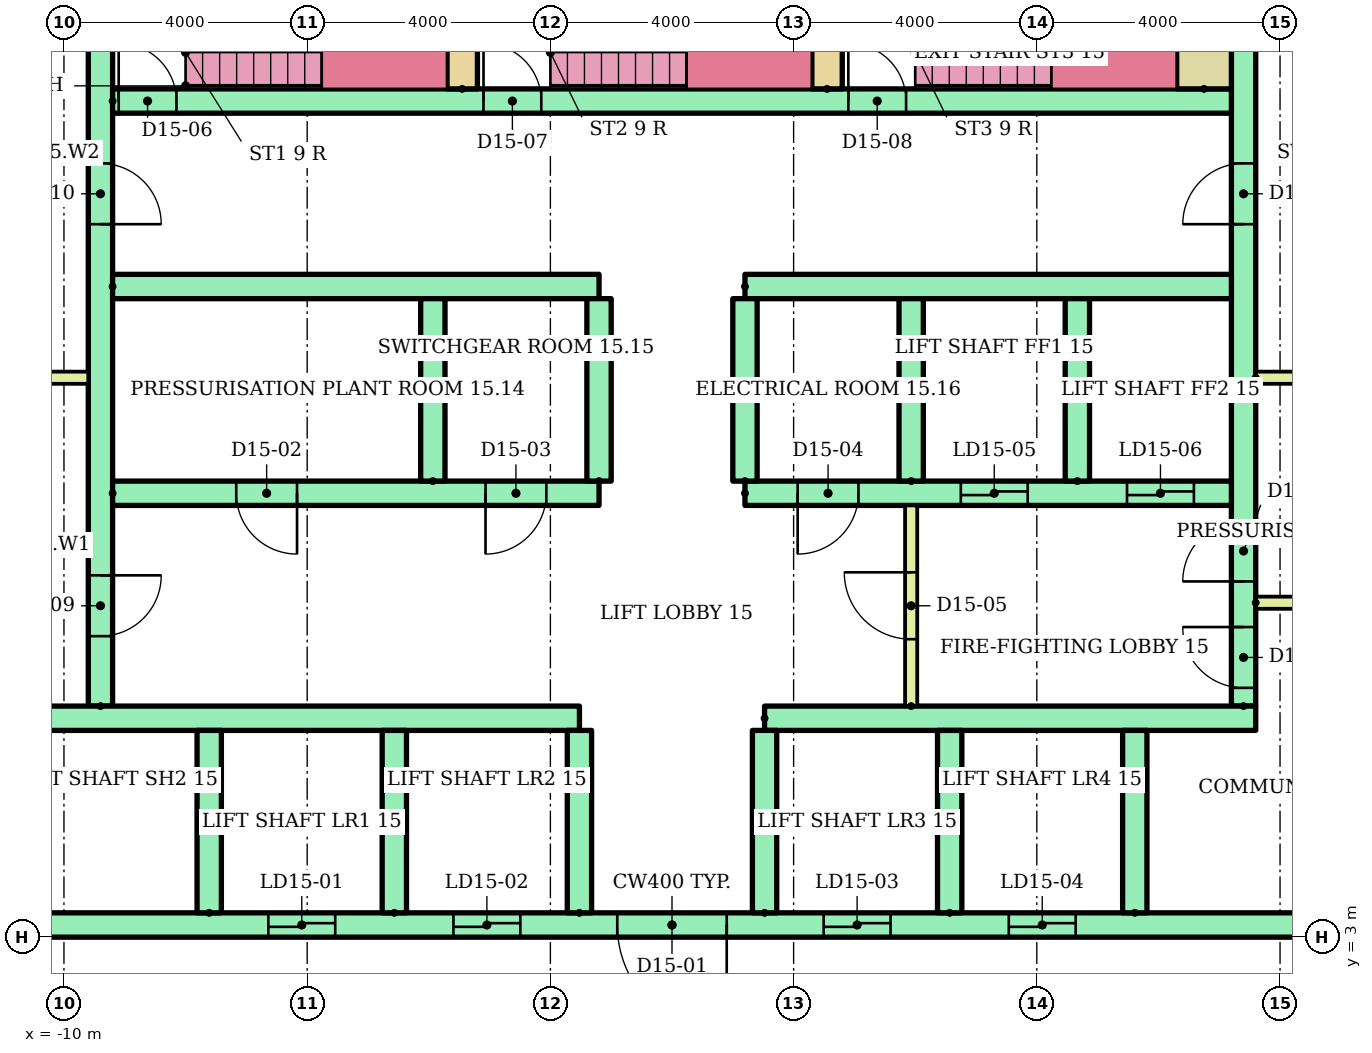
"""IFC4 building model, lengths in metres.
Left out: names, types, materials, properties, quantities, classifications, styles, units other than length and angle.
Written with IfcOpenShell. Run it as: python <this file> out.ifc"""

import sys

from ifc_helpers import new_model, si_unit, direction, frame, frame_2d, origin, place, context, subcontext, project, spatial, rectangle, extrude, element, fill, save


model = new_model("IFC4")
c1 = context("Model", 3, precision=1e-05, world=origin(), true_north=direction((0.0, 1.0)))
c2 = subcontext(c1, "Body", "Model", "MODEL_VIEW")
j1 = project(units=[si_unit("LENGTHUNIT", "METRE"), si_unit("PLANEANGLEUNIT", "RADIAN")], contexts=[c1])
p1 = place(None, origin())
s1 = spatial("IfcSite", under=j1, at=p1, CompositionType="ELEMENT")
p2 = place(p1, origin())
s2 = spatial("IfcBuilding", under=s1, at=p2, CompositionType="ELEMENT")
p3 = place(p2, frame((0.0, 0.0, 57.6)))
s3 = spatial("IfcBuildingStorey", under=s2, at=p3, CompositionType="ELEMENT", Elevation=57.6)
p4 = place(p3, frame((-9.4, 6.8, 0.0), z_axis=(0.0, 0.0, 1.0), x_axis=(0.0, 1.0, 0.0)))
e1 = element("IfcWall", 1, at=p4, inside=s3, PredefinedType="SHEAR", context=c2, shape_type="SweptSolid", body=[
    extrude(rectangle(XDim=12.7, YDim=0.4, at=frame_2d((6.35, 0.0))), origin(), (0.0, 0.0, 1.0), 2.92),
])
p5 = place(p4, frame((1.15, 0.0, 0.0)))
e2 = element("IfcOpeningElement", 2, at=p5, cuts=e1, PredefinedType="OPENING", context=c2, shape_type="SweptSolid", body=[
    extrude(rectangle(XDim=1.0, YDim=2.1, at=frame_2d((0.5, 1.05))), frame((0.0, 0.21, 0.0), z_axis=(0.0, -1.0, 0.0), x_axis=(1.0, 0.0, 0.0)), (0.0, 0.0, 1.0), 0.42),
])
p6 = place(p4, frame((7.925, 0.0, 0.0)))
e3 = element("IfcOpeningElement", 3, at=p6, cuts=e1, PredefinedType="OPENING", context=c2, shape_type="SweptSolid", body=[
    extrude(rectangle(XDim=1.0, YDim=2.1, at=frame_2d((0.5, 1.05))), frame((0.0, 0.21, 0.0), z_axis=(0.0, -1.0, 0.0), x_axis=(1.0, 0.0, 0.0)), (0.0, 0.0, 1.0), 0.42),
])
p7 = place(p3, frame((9.4, 6.8, 0.0), z_axis=(0.0, 0.0, 1.0), x_axis=(0.0, 1.0, 0.0)))
e4 = element("IfcWall", 4, at=p7, inside=s3, PredefinedType="SHEAR", context=c2, shape_type="SweptSolid", body=[
    extrude(rectangle(XDim=12.7, YDim=0.4, at=frame_2d((6.35, 0.0))), origin(), (0.0, 0.0, 1.0), 2.92),
])
p8 = place(p7, frame((0.3, 0.0, 0.0)))
e5 = element("IfcOpeningElement", 5, at=p8, cuts=e4, PredefinedType="OPENING", context=c2, shape_type="SweptSolid", body=[
    extrude(rectangle(XDim=1.0, YDim=2.1, at=frame_2d((0.5, 1.05))), frame((0.0, 0.21, 0.0), z_axis=(0.0, -1.0, 0.0), x_axis=(1.0, 0.0, 0.0)), (0.0, 0.0, 1.0), 0.42),
])
p9 = place(p7, frame((2.05, 0.0, 0.0)))
e6 = element("IfcOpeningElement", 6, at=p9, cuts=e4, PredefinedType="OPENING", context=c2, shape_type="SweptSolid", body=[
    extrude(rectangle(XDim=1.0, YDim=2.1, at=frame_2d((0.5, 1.05))), frame((0.0, 0.21, 0.0), z_axis=(0.0, -1.0, 0.0), x_axis=(1.0, 0.0, 0.0)), (0.0, 0.0, 1.0), 0.42),
])
p10 = place(p7, frame((7.925, 0.0, 0.0)))
e7 = element("IfcOpeningElement", 7, at=p10, cuts=e4, PredefinedType="OPENING", context=c2, shape_type="SweptSolid", body=[
    extrude(rectangle(XDim=1.0, YDim=2.1, at=frame_2d((0.5, 1.05))), frame((0.0, 0.21, 0.0), z_axis=(0.0, -1.0, 0.0), x_axis=(1.0, 0.0, 0.0)), (0.0, 0.0, 1.0), 0.42),
])
p11 = place(p3, frame((-13.5, 3.2, 0.0)))
e8 = element("IfcWall", 8, at=p11, inside=s3, PredefinedType="SHEAR", context=c2, shape_type="SweptSolid", body=[
    extrude(rectangle(XDim=27.0, YDim=0.4, at=frame_2d((13.5, 0.0))), origin(), (0.0, 0.0, 1.0), 2.92),
])
p12 = place(p11, frame((6.861, 0.0, 0.0)))
e9 = element("IfcOpeningElement", 9, at=p12, cuts=e8, PredefinedType="OPENING", context=c2, shape_type="SweptSolid", body=[
    extrude(rectangle(XDim=1.1, YDim=2.1, at=frame_2d((0.55, 1.05))), frame((0.0, 0.21, 0.0), z_axis=(0.0, -1.0, 0.0), x_axis=(1.0, 0.0, 0.0)), (0.0, 0.0, 1.0), 0.42),
])
p13 = place(p11, frame((9.906, 0.0, 0.0)))
e10 = element("IfcOpeningElement", 10, at=p13, cuts=e8, PredefinedType="OPENING", context=c2, shape_type="SweptSolid", body=[
    extrude(rectangle(XDim=1.1, YDim=2.1, at=frame_2d((0.55, 1.05))), frame((0.0, 0.21, 0.0), z_axis=(0.0, -1.0, 0.0), x_axis=(1.0, 0.0, 0.0)), (0.0, 0.0, 1.0), 0.42),
])
p14 = place(p11, frame((15.994, 0.0, 0.0)))
e11 = element("IfcOpeningElement", 11, at=p14, cuts=e8, PredefinedType="OPENING", context=c2, shape_type="SweptSolid", body=[
    extrude(rectangle(XDim=1.1, YDim=2.1, at=frame_2d((0.55, 1.05))), frame((0.0, 0.21, 0.0), z_axis=(0.0, -1.0, 0.0), x_axis=(1.0, 0.0, 0.0)), (0.0, 0.0, 1.0), 0.42),
])
p15 = place(p11, frame((19.039, 0.0, 0.0)))
e12 = element("IfcOpeningElement", 12, at=p15, cuts=e8, PredefinedType="OPENING", context=c2, shape_type="SweptSolid", body=[
    extrude(rectangle(XDim=1.1, YDim=2.1, at=frame_2d((0.55, 1.05))), frame((0.0, 0.21, 0.0), z_axis=(0.0, -1.0, 0.0), x_axis=(1.0, 0.0, 0.0)), (0.0, 0.0, 1.0), 0.42),
])
p16 = place(p11, frame((12.6, 0.0, 0.0)))
e13 = element("IfcOpeningElement", 13, at=p16, cuts=e8, PredefinedType="OPENING", context=c2, shape_type="SweptSolid", body=[
    extrude(rectangle(XDim=1.8, YDim=2.1, at=frame_2d((0.9, 1.05))), frame((0.0, 0.21, 0.0), z_axis=(0.0, -1.0, 0.0), x_axis=(1.0, 0.0, 0.0)), (0.0, 0.0, 1.0), 0.42),
])
p17 = place(p3, frame((-13.5, 6.6, 0.0)))
e14 = element("IfcWall", 14, at=p17, inside=s3, PredefinedType="SHEAR", context=c2, shape_type="SweptSolid", body=[
    extrude(rectangle(XDim=11.978, YDim=0.4, at=frame_2d((5.989, 0.0))), origin(), (0.0, 0.0, 1.0), 2.92),
])
p18 = place(p3, frame((1.522, 6.6, 0.0)))
e15 = element("IfcWall", 15, at=p18, inside=s3, PredefinedType="SHEAR", context=c2, shape_type="SweptSolid", body=[
    extrude(rectangle(XDim=8.078, YDim=0.4, at=frame_2d((4.039, 0.0))), origin(), (0.0, 0.0, 1.0), 2.92),
])
for number, where, z_axis, x_axis in (
    (16, (-7.611, 3.4, 0.0), (0.0, 0.0, 1.0), (0.0, 1.0, 0.0)),
    (17, (-4.567, 3.4, 0.0), (0.0, 0.0, 1.0), (0.0, 1.0, 0.0)),
    (18, (-1.522, 3.4, 0.0), (0.0, 0.0, 1.0), (0.0, 1.0, 0.0)),
    (19, (1.522, 3.4, 0.0), (0.0, 0.0, 1.0), (0.0, 1.0, 0.0)),
    (20, (4.567, 3.4, 0.0), (0.0, 0.0, 1.0), (0.0, 1.0, 0.0)),
    (21, (7.611, 3.4, 0.0), (0.0, 0.0, 1.0), (0.0, 1.0, 0.0)),
):
    element("IfcWall", number, at=place(p3, frame(where, z_axis=z_axis, x_axis=x_axis)), inside=s3, PredefinedType="SHEAR", context=c2, shape_type="SweptSolid", body=[
        extrude(rectangle(XDim=3.0, YDim=0.4, at=frame_2d((1.5, 0.0))), origin(), (0.0, 0.0, 1.0), 2.92),
    ])
p19 = place(p3, frame((-9.2, 10.3, 0.0)))
e22 = element("IfcWall", 22, at=p19, inside=s3, PredefinedType="SHEAR", context=c2, shape_type="SweptSolid", body=[
    extrude(rectangle(XDim=8.0, YDim=0.4, at=frame_2d((4.0, 0.0))), origin(), (0.0, 0.0, 1.0), 2.92),
])
p20 = place(p19, frame((2.033, 0.0, 0.0)))
e23 = element("IfcOpeningElement", 23, at=p20, cuts=e22, PredefinedType="OPENING", context=c2, shape_type="SweptSolid", body=[
    extrude(rectangle(XDim=1.0, YDim=2.1, at=frame_2d((0.5, 1.05))), frame((0.0, 0.21, 0.0), z_axis=(0.0, -1.0, 0.0), x_axis=(1.0, 0.0, 0.0)), (0.0, 0.0, 1.0), 0.42),
])
p21 = place(p19, frame((6.133, 0.0, 0.0)))
e24 = element("IfcOpeningElement", 24, at=p21, cuts=e22, PredefinedType="OPENING", context=c2, shape_type="SweptSolid", body=[
    extrude(rectangle(XDim=1.0, YDim=2.1, at=frame_2d((0.5, 1.05))), frame((0.0, 0.21, 0.0), z_axis=(0.0, -1.0, 0.0), x_axis=(1.0, 0.0, 0.0)), (0.0, 0.0, 1.0), 0.42),
])
p22 = place(p3, frame((-9.2, 13.7, 0.0)))
e25 = element("IfcWall", 25, at=p22, inside=s3, PredefinedType="SHEAR", context=c2, shape_type="SweptSolid", body=[
    extrude(rectangle(XDim=8.0, YDim=0.4, at=frame_2d((4.0, 0.0))), origin(), (0.0, 0.0, 1.0), 2.92),
])
p23 = place(p3, frame((1.2, 10.3, 0.0)))
e26 = element("IfcWall", 26, at=p23, inside=s3, PredefinedType="SHEAR", context=c2, shape_type="SweptSolid", body=[
    extrude(rectangle(XDim=8.0, YDim=0.4, at=frame_2d((4.0, 0.0))), origin(), (0.0, 0.0, 1.0), 2.92),
])
p24 = place(p23, frame((3.55, 0.0, 0.0)))
e27 = element("IfcOpeningElement", 27, at=p24, cuts=e26, PredefinedType="OPENING", context=c2, shape_type="SweptSolid", body=[
    extrude(rectangle(XDim=1.1, YDim=2.1, at=frame_2d((0.55, 1.05))), frame((0.0, 0.21, 0.0), z_axis=(0.0, -1.0, 0.0), x_axis=(1.0, 0.0, 0.0)), (0.0, 0.0, 1.0), 0.42),
])
p25 = place(p23, frame((6.283, 0.0, 0.0)))
e28 = element("IfcOpeningElement", 28, at=p25, cuts=e26, PredefinedType="OPENING", context=c2, shape_type="SweptSolid", body=[
    extrude(rectangle(XDim=1.1, YDim=2.1, at=frame_2d((0.55, 1.05))), frame((0.0, 0.21, 0.0), z_axis=(0.0, -1.0, 0.0), x_axis=(1.0, 0.0, 0.0)), (0.0, 0.0, 1.0), 0.42),
])
p26 = place(p23, frame((0.867, 0.0, 0.0)))
e29 = element("IfcOpeningElement", 29, at=p26, cuts=e26, PredefinedType="OPENING", context=c2, shape_type="SweptSolid", body=[
    extrude(rectangle(XDim=1.0, YDim=2.1, at=frame_2d((0.5, 1.05))), frame((0.0, 0.21, 0.0), z_axis=(0.0, -1.0, 0.0), x_axis=(1.0, 0.0, 0.0)), (0.0, 0.0, 1.0), 0.42),
])
p27 = place(p3, frame((1.2, 13.7, 0.0)))
e30 = element("IfcWall", 30, at=p27, inside=s3, PredefinedType="SHEAR", context=c2, shape_type="SweptSolid", body=[
    extrude(rectangle(XDim=8.0, YDim=0.4, at=frame_2d((4.0, 0.0))), origin(), (0.0, 0.0, 1.0), 2.92),
])
for number, where, z_axis, x_axis in (
    (31, (-3.933, 10.5, 0.0), (0.0, 0.0, 1.0), (0.0, 1.0, 0.0)),
    (32, (-1.2, 10.5, 0.0), (0.0, 0.0, 1.0), (0.0, 1.0, 0.0)),
    (33, (1.2, 10.5, 0.0), (0.0, 0.0, 1.0), (0.0, 1.0, 0.0)),
    (34, (3.933, 10.5, 0.0), (0.0, 0.0, 1.0), (0.0, 1.0, 0.0)),
    (35, (6.667, 10.5, 0.0), (0.0, 0.0, 1.0), (0.0, 1.0, 0.0)),
):
    element("IfcWall", number, at=place(p3, frame(where, z_axis=z_axis, x_axis=x_axis)), inside=s3, PredefinedType="SHEAR", context=c2, shape_type="SweptSolid", body=[
        extrude(rectangle(XDim=3.0, YDim=0.4, at=frame_2d((1.5, 0.0))), origin(), (0.0, 0.0, 1.0), 2.92),
    ])
p28 = place(p3, frame((3.933, 6.8, 0.0), z_axis=(0.0, 0.0, 1.0), x_axis=(0.0, 1.0, 0.0)))
e36 = element("IfcWall", 36, at=p28, inside=s3, PredefinedType="PARTITIONING", context=c2, shape_type="SweptSolid", body=[
    extrude(rectangle(XDim=3.3, YDim=0.2, at=frame_2d((1.65, 0.0))), origin(), (0.0, 0.0, 1.0), 2.92),
])
p29 = place(p28, frame((1.1, 0.0, 0.0)))
e37 = element("IfcOpeningElement", 37, at=p29, cuts=e36, PredefinedType="OPENING", context=c2, shape_type="SweptSolid", body=[
    extrude(rectangle(XDim=1.1, YDim=2.1, at=frame_2d((0.55, 1.05))), frame((0.0, 0.11, 0.0), z_axis=(0.0, -1.0, 0.0), x_axis=(1.0, 0.0, 0.0)), (0.0, 0.0, 1.0), 0.22),
])
p30 = place(p3, frame((-9.2, 16.75, 0.0)))
e38 = element("IfcWall", 38, at=p30, inside=s3, PredefinedType="SHEAR", context=c2, shape_type="SweptSolid", body=[
    extrude(rectangle(XDim=18.4, YDim=0.4, at=frame_2d((9.2, 0.0))), origin(), (0.0, 0.0, 1.0), 2.92),
])
p31 = place(p30, frame((0.1, 0.0, 0.0)))
e39 = element("IfcOpeningElement", 39, at=p31, cuts=e38, PredefinedType="OPENING", context=c2, shape_type="SweptSolid", body=[
    extrude(rectangle(XDim=0.95, YDim=2.1, at=frame_2d((0.475, 1.05))), frame((0.0, 0.21, 0.0), z_axis=(0.0, -1.0, 0.0), x_axis=(1.0, 0.0, 0.0)), (0.0, 0.0, 1.0), 0.42),
])
p32 = place(p30, frame((6.1, 0.0, 0.0)))
e40 = element("IfcOpeningElement", 40, at=p32, cuts=e38, PredefinedType="OPENING", context=c2, shape_type="SweptSolid", body=[
    extrude(rectangle(XDim=0.95, YDim=2.1, at=frame_2d((0.475, 1.05))), frame((0.0, 0.21, 0.0), z_axis=(0.0, -1.0, 0.0), x_axis=(1.0, 0.0, 0.0)), (0.0, 0.0, 1.0), 0.42),
])
p33 = place(p30, frame((12.1, 0.0, 0.0)))
e41 = element("IfcOpeningElement", 41, at=p33, cuts=e38, PredefinedType="OPENING", context=c2, shape_type="SweptSolid", body=[
    extrude(rectangle(XDim=0.95, YDim=2.1, at=frame_2d((0.475, 1.05))), frame((0.0, 0.21, 0.0), z_axis=(0.0, -1.0, 0.0), x_axis=(1.0, 0.0, 0.0)), (0.0, 0.0, 1.0), 0.42),
])
for number, where, z_axis, x_axis in (
    (42, (-3.45, 16.95, 0.0), (0.0, 0.0, 1.0), (0.0, 1.0, 0.0)),
    (43, (2.55, 16.95, 0.0), (0.0, 0.0, 1.0), (0.0, 1.0, 0.0)),
):
    element("IfcWall", number, at=place(p3, frame(where, z_axis=z_axis, x_axis=x_axis)), inside=s3, PredefinedType="SHEAR", context=c2, shape_type="SweptSolid", body=[
        extrude(rectangle(XDim=2.55, YDim=0.5, at=frame_2d((1.275, 0.0))), origin(), (0.0, 0.0, 1.0), 2.92),
    ])
p34 = place(p3, frame((8.75, 16.95, 0.0), z_axis=(0.0, 0.0, 1.0), x_axis=(0.0, 1.0, 0.0)))
e44 = element("IfcWall", 44, at=p34, inside=s3, PredefinedType="SHEAR", context=c2, shape_type="SweptSolid", body=[
    extrude(rectangle(XDim=2.55, YDim=0.9, at=frame_2d((1.275, 0.0))), origin(), (0.0, 0.0, 1.0), 2.92),
])
for number, where in (
    (45, (-13.5, 12.2, 0.0)),
    (46, (9.6, 8.5, 0.0)),
    (47, (9.6, 12.2, 0.0)),
):
    element("IfcWall", number, at=place(p3, frame(where)), inside=s3, PredefinedType="PARTITIONING", context=c2, shape_type="SweptSolid", body=[
        extrude(rectangle(XDim=3.9, YDim=0.2, at=frame_2d((1.95, 0.0))), origin(), (0.0, 0.0, 1.0), 2.92),
    ])
p35 = place(p12, origin())
e48 = element("IfcDoor", 48, at=p35, inside=s3, OperationType="SLIDING_TO_LEFT", PredefinedType="DOOR", context=c2, shape_type="SweptSolid", body=[
    extrude(rectangle(XDim=1.1, YDim=2.1, at=frame_2d((0.55, 1.05))), frame((0.0, 0.025, 0.0), z_axis=(0.0, -1.0, 0.0), x_axis=(1.0, 0.0, 0.0)), (0.0, 0.0, 1.0), 0.05),
])
fill(e9, e48)
p36 = place(p13, origin())
e49 = element("IfcDoor", 49, at=p36, inside=s3, OperationType="SLIDING_TO_LEFT", PredefinedType="DOOR", context=c2, shape_type="SweptSolid", body=[
    extrude(rectangle(XDim=1.1, YDim=2.1, at=frame_2d((0.55, 1.05))), frame((0.0, 0.025, 0.0), z_axis=(0.0, -1.0, 0.0), x_axis=(1.0, 0.0, 0.0)), (0.0, 0.0, 1.0), 0.05),
])
fill(e10, e49)
p37 = place(p14, origin())
e50 = element("IfcDoor", 50, at=p37, inside=s3, OperationType="SLIDING_TO_LEFT", PredefinedType="DOOR", context=c2, shape_type="SweptSolid", body=[
    extrude(rectangle(XDim=1.1, YDim=2.1, at=frame_2d((0.55, 1.05))), frame((0.0, 0.025, 0.0), z_axis=(0.0, -1.0, 0.0), x_axis=(1.0, 0.0, 0.0)), (0.0, 0.0, 1.0), 0.05),
])
fill(e11, e50)
p38 = place(p15, origin())
e51 = element("IfcDoor", 51, at=p38, inside=s3, OperationType="SLIDING_TO_LEFT", PredefinedType="DOOR", context=c2, shape_type="SweptSolid", body=[
    extrude(rectangle(XDim=1.1, YDim=2.1, at=frame_2d((0.55, 1.05))), frame((0.0, 0.025, 0.0), z_axis=(0.0, -1.0, 0.0), x_axis=(1.0, 0.0, 0.0)), (0.0, 0.0, 1.0), 0.05),
])
fill(e12, e51)
p39 = place(p16, frame((1.8, 0.0, 0.0), z_axis=(0.0, 0.0, 1.0), x_axis=(-1.0, 0.0, 0.0)))
e52 = element("IfcDoor", 52, at=p39, inside=s3, OperationType="DOUBLE_DOOR_SINGLE_SWING", PredefinedType="DOOR", context=c2, shape_type="SweptSolid", body=[
    extrude(rectangle(XDim=1.8, YDim=2.1, at=frame_2d((0.9, 1.05))), frame((0.0, 0.025, 0.0), z_axis=(0.0, -1.0, 0.0), x_axis=(1.0, 0.0, 0.0)), (0.0, 0.0, 1.0), 0.05),
])
fill(e13, e52)
p40 = place(p24, origin())
e53 = element("IfcDoor", 53, at=p40, inside=s3, OperationType="SLIDING_TO_LEFT", PredefinedType="DOOR", context=c2, shape_type="SweptSolid", body=[
    extrude(rectangle(XDim=1.1, YDim=2.1, at=frame_2d((0.55, 1.05))), frame((0.0, 0.025, 0.0), z_axis=(0.0, -1.0, 0.0), x_axis=(1.0, 0.0, 0.0)), (0.0, 0.0, 1.0), 0.05),
])
fill(e27, e53)
p41 = place(p25, origin())
e54 = element("IfcDoor", 54, at=p41, inside=s3, OperationType="SLIDING_TO_LEFT", PredefinedType="DOOR", context=c2, shape_type="SweptSolid", body=[
    extrude(rectangle(XDim=1.1, YDim=2.1, at=frame_2d((0.55, 1.05))), frame((0.0, 0.025, 0.0), z_axis=(0.0, -1.0, 0.0), x_axis=(1.0, 0.0, 0.0)), (0.0, 0.0, 1.0), 0.05),
])
fill(e28, e54)
p42 = place(p20, frame((1.0, 0.0, 0.0), z_axis=(0.0, 0.0, 1.0), x_axis=(-1.0, 0.0, 0.0)))
e55 = element("IfcDoor", 55, at=p42, inside=s3, OperationType="SINGLE_SWING_RIGHT", PredefinedType="DOOR", context=c2, shape_type="SweptSolid", body=[
    extrude(rectangle(XDim=1.0, YDim=2.1, at=frame_2d((0.5, 1.05))), frame((0.0, 0.025, 0.0), z_axis=(0.0, -1.0, 0.0), x_axis=(1.0, 0.0, 0.0)), (0.0, 0.0, 1.0), 0.05),
])
fill(e23, e55)
p43 = place(p21, frame((1.0, 0.0, 0.0), z_axis=(0.0, 0.0, 1.0), x_axis=(-1.0, 0.0, 0.0)))
e56 = element("IfcDoor", 56, at=p43, inside=s3, OperationType="SINGLE_SWING_LEFT", PredefinedType="DOOR", context=c2, shape_type="SweptSolid", body=[
    extrude(rectangle(XDim=1.0, YDim=2.1, at=frame_2d((0.5, 1.05))), frame((0.0, 0.025, 0.0), z_axis=(0.0, -1.0, 0.0), x_axis=(1.0, 0.0, 0.0)), (0.0, 0.0, 1.0), 0.05),
])
fill(e24, e56)
p44 = place(p26, frame((1.0, 0.0, 0.0), z_axis=(0.0, 0.0, 1.0), x_axis=(-1.0, 0.0, 0.0)))
e57 = element("IfcDoor", 57, at=p44, inside=s3, OperationType="SINGLE_SWING_LEFT", PredefinedType="DOOR", context=c2, shape_type="SweptSolid", body=[
    extrude(rectangle(XDim=1.0, YDim=2.1, at=frame_2d((0.5, 1.05))), frame((0.0, 0.025, 0.0), z_axis=(0.0, -1.0, 0.0), x_axis=(1.0, 0.0, 0.0)), (0.0, 0.0, 1.0), 0.05),
])
fill(e29, e57)
p45 = place(p29, origin())
e58 = element("IfcDoor", 58, at=p45, inside=s3, OperationType="SINGLE_SWING_RIGHT", PredefinedType="DOOR", context=c2, shape_type="SweptSolid", body=[
    extrude(rectangle(XDim=1.1, YDim=2.1, at=frame_2d((0.55, 1.05))), frame((0.0, 0.025, 0.0), z_axis=(0.0, -1.0, 0.0), x_axis=(1.0, 0.0, 0.0)), (0.0, 0.0, 1.0), 0.05),
])
fill(e37, e58)
p46 = place(p31, origin())
e59 = element("IfcDoor", 59, at=p46, inside=s3, OperationType="SINGLE_SWING_LEFT", PredefinedType="DOOR", context=c2, shape_type="SweptSolid", body=[
    extrude(rectangle(XDim=0.95, YDim=2.1, at=frame_2d((0.475, 1.05))), frame((0.0, 0.025, 0.0), z_axis=(0.0, -1.0, 0.0), x_axis=(1.0, 0.0, 0.0)), (0.0, 0.0, 1.0), 0.05),
])
fill(e39, e59)
p47 = place(p32, origin())
e60 = element("IfcDoor", 60, at=p47, inside=s3, OperationType="SINGLE_SWING_LEFT", PredefinedType="DOOR", context=c2, shape_type="SweptSolid", body=[
    extrude(rectangle(XDim=0.95, YDim=2.1, at=frame_2d((0.475, 1.05))), frame((0.0, 0.025, 0.0), z_axis=(0.0, -1.0, 0.0), x_axis=(1.0, 0.0, 0.0)), (0.0, 0.0, 1.0), 0.05),
])
fill(e40, e60)
p48 = place(p33, origin())
e61 = element("IfcDoor", 61, at=p48, inside=s3, OperationType="SINGLE_SWING_LEFT", PredefinedType="DOOR", context=c2, shape_type="SweptSolid", body=[
    extrude(rectangle(XDim=0.95, YDim=2.1, at=frame_2d((0.475, 1.05))), frame((0.0, 0.025, 0.0), z_axis=(0.0, -1.0, 0.0), x_axis=(1.0, 0.0, 0.0)), (0.0, 0.0, 1.0), 0.05),
])
fill(e41, e61)
p49 = place(p5, frame((1.0, 0.0, 0.0), z_axis=(0.0, 0.0, 1.0), x_axis=(-1.0, 0.0, 0.0)))
e62 = element("IfcDoor", 62, at=p49, inside=s3, OperationType="SINGLE_SWING_RIGHT", PredefinedType="DOOR", context=c2, shape_type="SweptSolid", body=[
    extrude(rectangle(XDim=1.0, YDim=2.1, at=frame_2d((0.5, 1.05))), frame((0.0, 0.025, 0.0), z_axis=(0.0, -1.0, 0.0), x_axis=(1.0, 0.0, 0.0)), (0.0, 0.0, 1.0), 0.05),
])
fill(e2, e62)
p50 = place(p6, frame((1.0, 0.0, 0.0), z_axis=(0.0, 0.0, 1.0), x_axis=(-1.0, 0.0, 0.0)))
e63 = element("IfcDoor", 63, at=p50, inside=s3, OperationType="SINGLE_SWING_LEFT", PredefinedType="DOOR", context=c2, shape_type="SweptSolid", body=[
    extrude(rectangle(XDim=1.0, YDim=2.1, at=frame_2d((0.5, 1.05))), frame((0.0, 0.025, 0.0), z_axis=(0.0, -1.0, 0.0), x_axis=(1.0, 0.0, 0.0)), (0.0, 0.0, 1.0), 0.05),
])
fill(e3, e63)
p51 = place(p8, origin())
e64 = element("IfcDoor", 64, at=p51, inside=s3, OperationType="SINGLE_SWING_RIGHT", PredefinedType="DOOR", context=c2, shape_type="SweptSolid", body=[
    extrude(rectangle(XDim=1.0, YDim=2.1, at=frame_2d((0.5, 1.05))), frame((0.0, 0.025, 0.0), z_axis=(0.0, -1.0, 0.0), x_axis=(1.0, 0.0, 0.0)), (0.0, 0.0, 1.0), 0.05),
])
fill(e5, e64)
p52 = place(p9, origin())
e65 = element("IfcDoor", 65, at=p52, inside=s3, OperationType="SINGLE_SWING_LEFT", PredefinedType="DOOR", context=c2, shape_type="SweptSolid", body=[
    extrude(rectangle(XDim=1.0, YDim=2.1, at=frame_2d((0.5, 1.05))), frame((0.0, 0.025, 0.0), z_axis=(0.0, -1.0, 0.0), x_axis=(1.0, 0.0, 0.0)), (0.0, 0.0, 1.0), 0.05),
])
fill(e6, e65)
p53 = place(p10, origin())
e66 = element("IfcDoor", 66, at=p53, inside=s3, OperationType="SINGLE_SWING_LEFT", PredefinedType="DOOR", context=c2, shape_type="SweptSolid", body=[
    extrude(rectangle(XDim=1.0, YDim=2.1, at=frame_2d((0.5, 1.05))), frame((0.0, 0.025, 0.0), z_axis=(0.0, -1.0, 0.0), x_axis=(1.0, 0.0, 0.0)), (0.0, 0.0, 1.0), 0.05),
])
fill(e7, e66)
save(model, sys.argv[1])
